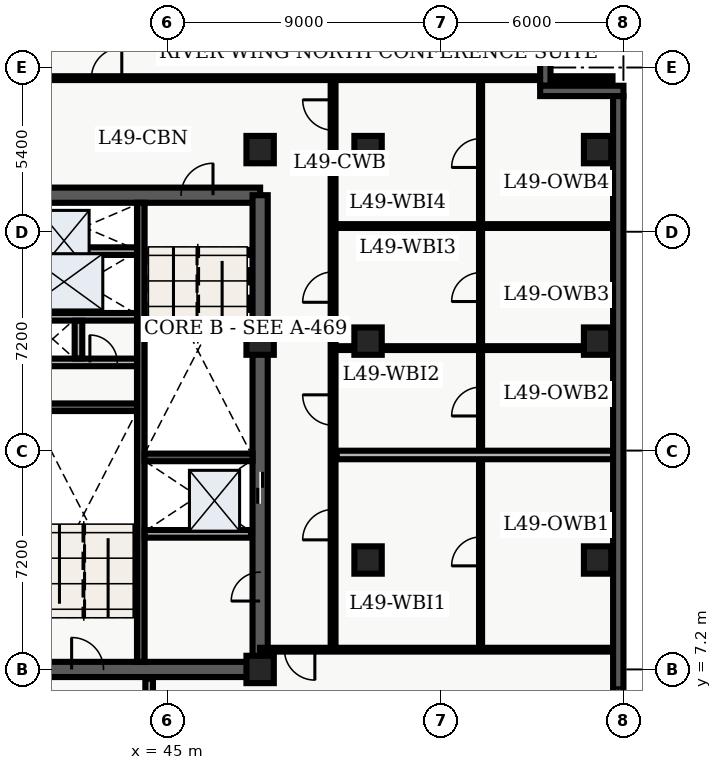
"""IFC4 building model, lengths in metres.
Left out: names, types, materials, properties, quantities, classifications, styles, units other than length and angle.
Written with IfcOpenShell. Run it as: python <this file> out.ifc"""

import sys

from ifc_helpers import new_model, entity, si_unit, converted_unit, direction, frame, origin_with_axes, origin_2d_with_axis, place, context, subcontext, project, spatial, polyline, rectangle, outline, extrude, element, fill, save


model = new_model("IFC4")
c1 = context("Model", 3, precision=1e-05, world=origin_with_axes(), true_north=direction((0.0, 1.0)))
c2 = subcontext(c1, "Body", "Model", "MODEL_VIEW")
j1 = project(units=[si_unit("LENGTHUNIT", "METRE"), converted_unit("PLANEANGLEUNIT", "DEGREE", entity("IfcPlaneAngleMeasure", 0.017), si_unit("PLANEANGLEUNIT", "RADIAN"), dimensions=[0, 0, 0, 0, 0, 0, 0])], contexts=[c1])
p1 = place(None, origin_with_axes())
s1 = spatial("IfcSite", under=j1, at=p1, CompositionType="ELEMENT")
p2 = place(p1, origin_with_axes())
s2 = spatial("IfcBuilding", under=s1, at=p2, CompositionType="ELEMENT")
p3 = place(p2, frame((0.0, 0.0, 200.4), z_axis=(0.0, 0.0, 1.0), x_axis=(1.0, 0.0, 0.0)))
s3 = spatial("IfcBuildingStorey", under=s2, at=p3, CompositionType="ELEMENT", Elevation=200.4)
p4 = place(p3, frame((40.2, 7.2, 0.0), z_axis=(0.0, 0.0, 1.0), x_axis=(1.0, 0.0, 0.0)))
e1 = element("IfcWall", 1, at=p4, inside=s3, PredefinedType="SHEAR", context=c2, shape_type="SweptSolid", body=[
    extrude(outline(polyline([(0.0, -0.25), (7.85, -0.25), (7.85, 0.25), (0.0, 0.25), (0.0, -0.25)])), origin_with_axes(), (0.0, 0.0, 1.0), 3.66),
])
p5 = place(p4, frame((2.175, 0.0, 0.0), z_axis=(0.0, 0.0, 1.0), x_axis=(1.0, 0.0, 0.0)))
e2 = element("IfcOpeningElement", 2, at=p5, cuts=e1, PredefinedType="OPENING", context=c2, shape_type="SweptSolid", body=[
    extrude(rectangle(XDim=1.05, YDim=0.52, at=origin_2d_with_axis()), origin_with_axes(), (0.0, 0.0, 1.0), 2.15),
])
p6 = place(p3, frame((40.2, 22.8, 0.0), z_axis=(0.0, 0.0, 1.0), x_axis=(1.0, 0.0, 0.0)))
e3 = element("IfcWall", 3, at=p6, inside=s3, PredefinedType="SHEAR", context=c2, shape_type="SweptSolid", body=[
    extrude(outline(polyline([(0.0, -0.25), (7.85, -0.25), (7.85, 0.25), (0.0, 0.25), (0.0, -0.25)])), origin_with_axes(), (0.0, 0.0, 1.0), 3.66),
])
p7 = place(p6, frame((5.775, 0.0, 0.0), z_axis=(0.0, 0.0, 1.0), x_axis=(1.0, 0.0, 0.0)))
e4 = element("IfcOpeningElement", 4, at=p7, cuts=e3, PredefinedType="OPENING", context=c2, shape_type="SweptSolid", body=[
    extrude(rectangle(XDim=1.05, YDim=0.52, at=origin_2d_with_axis()), origin_with_axes(), (0.0, 0.0, 1.0), 2.15),
])
p8 = place(p3, frame((48.05, 7.2, 0.0), z_axis=(0.0, 0.0, 1.0), x_axis=(0.0, 1.0, 0.0)))
e5 = element("IfcWall", 5, at=p8, inside=s3, PredefinedType="SHEAR", context=c2, shape_type="SweptSolid", body=[
    extrude(outline(polyline([(0.0, -0.25), (15.6, -0.25), (15.6, 0.25), (0.0, 0.25), (0.0, -0.25)])), origin_with_axes(), (0.0, 0.0, 1.0), 3.66),
])
p9 = place(p8, frame((5.975, 0.0, 0.0), z_axis=(0.0, 0.0, 1.0), x_axis=(1.0, 0.0, 0.0)))
e6 = element("IfcOpeningElement", 6, at=p9, cuts=e5, PredefinedType="OPENING", context=c2, shape_type="SweptSolid", body=[
    extrude(rectangle(XDim=1.05, YDim=0.52, at=origin_2d_with_axis()), origin_with_axes(), (0.0, 0.0, 1.0), 2.15),
])
p10 = place(p8, frame((2.725, 0.0, 0.0), z_axis=(0.0, 0.0, 1.0), x_axis=(1.0, 0.0, 0.0)))
e7 = element("IfcOpeningElement", 7, at=p10, cuts=e5, PredefinedType="OPENING", context=c2, shape_type="SweptSolid", body=[
    extrude(rectangle(XDim=0.95, YDim=0.52, at=origin_2d_with_axis()), origin_with_axes(), (0.0, 0.0, 1.0), 2.15),
])
p11 = place(p3, frame((44.125, 7.45, 0.0), z_axis=(0.0, 0.0, 1.0), x_axis=(0.0, 1.0, 0.0)))
e8 = element("IfcWall", 8, at=p11, inside=s3, PredefinedType="SHEAR", context=c2, shape_type="SweptSolid", body=[
    extrude(outline(polyline([(0.0, -0.125), (15.1, -0.125), (15.1, 0.125), (0.0, 0.125), (0.0, -0.125)])), origin_with_axes(), (0.0, 0.0, 1.0), 3.66),
])
for number, where, z_axis, x_axis in (
    (9, (40.45, 15.825, 0.0), (0.0, 0.0, 1.0), (1.0, 0.0, 0.0)),
    (10, (44.25, 14.175, 0.0), (0.0, 0.0, 1.0), (1.0, 0.0, 0.0)),
):
    element("IfcWall", number, at=place(p3, frame(where, z_axis=z_axis, x_axis=x_axis)), inside=s3, PredefinedType="SHEAR", context=c2, shape_type="SweptSolid", body=[
        extrude(outline(polyline([(0.0, -0.125), (3.55, -0.125), (3.55, 0.125), (0.0, 0.125), (0.0, -0.125)])), origin_with_axes(), (0.0, 0.0, 1.0), 3.66),
    ])
p12 = place(p3, frame((40.5, 17.3, 0.0), z_axis=(0.0, 0.0, 1.0), x_axis=(1.0, 0.0, 0.0)))
e11 = element("IfcWall", 11, at=p12, inside=s3, PredefinedType="SOLIDWALL", context=c2, shape_type="SweptSolid", body=[
    extrude(outline(polyline([(0.0, -0.125), (3.5, -0.125), (3.5, 0.125), (0.0, 0.125), (0.0, -0.125)])), origin_with_axes(), (0.0, 0.0, 1.0), 2.7),
])
p13 = place(p12, frame((2.4, 0.0, 0.0), z_axis=(0.0, 0.0, 1.0), x_axis=(1.0, 0.0, 0.0)))
e12 = element("IfcOpeningElement", 12, at=p13, cuts=e11, PredefinedType="OPENING", context=c2, shape_type="SweptSolid", body=[
    extrude(rectangle(XDim=0.9, YDim=0.27, at=origin_2d_with_axis()), origin_with_axes(), (0.0, 0.0, 1.0), 2.15),
])
p14 = place(p3, frame((40.5, 18.8, 0.0), z_axis=(0.0, 0.0, 1.0), x_axis=(1.0, 0.0, 0.0)))
e13 = element("IfcWall", 13, at=p14, inside=s3, PredefinedType="SOLIDWALL", context=c2, shape_type="SweptSolid", body=[
    extrude(outline(polyline([(0.0, -0.125), (3.5, -0.125), (3.5, 0.125), (0.0, 0.125), (0.0, -0.125)])), origin_with_axes(), (0.0, 0.0, 1.0), 2.7),
])
p15 = place(p3, frame((42.075, 17.43, 0.0), z_axis=(0.0, 0.0, 1.0), x_axis=(0.0, 1.0, 0.0)))
e14 = element("IfcWall", 14, at=p15, inside=s3, PredefinedType="SOLIDWALL", context=c2, shape_type="SweptSolid", body=[
    extrude(outline(polyline([(0.0, -0.125), (1.24, -0.125), (1.24, 0.125), (0.0, 0.125), (0.0, -0.125)])), origin_with_axes(), (0.0, 0.0, 1.0), 2.7),
])
p16 = place(p3, frame((44.4, 3.1, 0.0), z_axis=(0.0, 0.0, 1.0), x_axis=(0.0, 1.0, 0.0)))
e15 = element("IfcWall", 15, at=p16, inside=s3, PredefinedType="SOLIDWALL", context=c2, shape_type="SweptSolid", body=[
    extrude(outline(polyline([(0.0, -0.125), (3.8, -0.125), (3.8, 0.125), (0.0, 0.125), (0.0, -0.125)])), origin_with_axes(), (0.0, 0.0, 1.0), 2.7),
])
for number, where, z_axis, x_axis in (
    (16, (48.05, 7.2, 0.0), (0.0, 0.0, 1.0), (1.0, 0.0, 0.0)),
    (17, (48.05, 18.0, 0.0), (0.0, 0.0, 1.0), (1.0, 0.0, 0.0)),
    (18, (48.05, 24.3, 0.0), (0.0, 0.0, 1.0), (1.0, 0.0, 0.0)),
    (19, (51.6, 10.8, 0.0), (0.0, 0.0, 1.0), (1.0, 0.0, 0.0)),
    (20, (51.6, 18.0, 0.0), (0.0, 0.0, 1.0), (1.0, 0.0, 0.0)),
    (21, (51.6, 24.3, 0.0), (0.0, 0.0, 1.0), (1.0, 0.0, 0.0)),
    (22, (59.15, 10.8, 0.0), (0.0, 0.0, 1.0), (1.0, 0.0, 0.0)),
    (23, (59.15, 18.0, 0.0), (0.0, 0.0, 1.0), (1.0, 0.0, 0.0)),
    (24, (59.15, 24.3, 0.0), (0.0, 0.0, 1.0), (1.0, 0.0, 0.0)),
):
    element("IfcColumn", number, at=place(p3, frame(where, z_axis=z_axis, x_axis=x_axis)), inside=s3, PredefinedType="COLUMN", context=c2, shape_type="SweptSolid", body=[
        extrude(rectangle(XDim=0.9, YDim=0.9, at=origin_2d_with_axis()), origin_with_axes(), (0.0, 0.0, 1.0), 3.9),
    ])
for number, where, z_axis, x_axis in (
    (25, (40.5, 20.96, 0.0), (0.0, 0.0, 1.0), (1.0, 0.0, 0.0)),
    (26, (44.25, 11.66, 0.0), (0.0, 0.0, 1.0), (1.0, 0.0, 0.0)),
):
    element("IfcWall", number, at=place(p3, frame(where, z_axis=z_axis, x_axis=x_axis)), inside=s3, PredefinedType="SOLIDWALL", context=c2, shape_type="SweptSolid", body=[
        extrude(outline(polyline([(0.0, -0.125), (3.5, -0.125), (3.5, 0.125), (0.0, 0.125), (0.0, -0.125)])), origin_with_axes(), (0.0, 0.0, 1.0), 2.7),
    ])
p17 = place(p3, frame((50.45, 7.85, 0.0), z_axis=(0.0, 0.0, 1.0), x_axis=(0.0, 1.0, 0.0)))
e27 = element("IfcWall", 27, at=p17, inside=s3, PredefinedType="PARTITIONING", context=c2, shape_type="SweptSolid", body=[
    extrude(outline(polyline([(0.0, -0.08), (18.8, -0.08), (18.8, 0.08), (0.0, 0.08), (0.0, -0.08)])), origin_with_axes(), (0.0, 0.0, 1.0), 2.7),
])
p18 = place(p17, frame((4.113, 0.0, 0.0), z_axis=(0.0, 0.0, 1.0), x_axis=(1.0, 0.0, 0.0)))
e28 = element("IfcOpeningElement", 28, at=p18, cuts=e27, PredefinedType="OPENING", context=c2, shape_type="SweptSolid", body=[
    extrude(rectangle(XDim=1.0, YDim=0.18, at=origin_2d_with_axis()), origin_with_axes(), (0.0, 0.0, 1.0), 2.15),
])
p19 = place(p17, frame((7.883, 0.0, 0.0), z_axis=(0.0, 0.0, 1.0), x_axis=(1.0, 0.0, 0.0)))
e29 = element("IfcOpeningElement", 29, at=p19, cuts=e27, PredefinedType="OPENING", context=c2, shape_type="SweptSolid", body=[
    extrude(rectangle(XDim=1.0, YDim=0.18, at=origin_2d_with_axis()), origin_with_axes(), (0.0, 0.0, 1.0), 2.15),
])
p20 = place(p17, frame((11.928, 0.0, 0.0), z_axis=(0.0, 0.0, 1.0), x_axis=(1.0, 0.0, 0.0)))
e30 = element("IfcOpeningElement", 30, at=p20, cuts=e27, PredefinedType="OPENING", context=c2, shape_type="SweptSolid", body=[
    extrude(rectangle(XDim=1.0, YDim=0.18, at=origin_2d_with_axis()), origin_with_axes(), (0.0, 0.0, 1.0), 2.15),
])
p21 = place(p17, frame((17.587, 0.0, 0.0), z_axis=(0.0, 0.0, 1.0), x_axis=(1.0, 0.0, 0.0)))
e31 = element("IfcOpeningElement", 31, at=p21, cuts=e27, PredefinedType="OPENING", context=c2, shape_type="SweptSolid", body=[
    extrude(rectangle(XDim=1.0, YDim=0.18, at=origin_2d_with_axis()), origin_with_axes(), (0.0, 0.0, 1.0), 2.15),
])
p22 = place(p3, frame((59.665, 7.85, 0.0), z_axis=(0.0, 0.0, 1.0), x_axis=(-1.0, 0.0, 0.0)))
e32 = element("IfcWall", 32, at=p22, inside=s3, PredefinedType="PARTITIONING", context=c2, shape_type="SweptSolid", body=[
    extrude(outline(polyline([(0.0, -0.062), (11.615, -0.062), (11.615, 0.062), (0.0, 0.062), (0.0, -0.062)])), origin_with_axes(), (0.0, 0.0, 1.0), 2.7),
])
p23 = place(p22, frame((10.315, 0.0, 0.0), z_axis=(0.0, 0.0, 1.0), x_axis=(1.0, 0.0, 0.0)))
e33 = element("IfcOpeningElement", 33, at=p23, cuts=e32, PredefinedType="OPENING", context=c2, shape_type="SweptSolid", body=[
    extrude(rectangle(XDim=1.0, YDim=0.145, at=origin_2d_with_axis()), origin_with_axes(), (0.0, 0.0, 1.0), 2.15),
])
p24 = place(p3, frame((38.735, 26.65, 0.0), z_axis=(0.0, 0.0, 1.0), x_axis=(1.0, 0.0, 0.0)))
e34 = element("IfcWall", 34, at=p24, inside=s3, PredefinedType="PARTITIONING", context=c2, shape_type="SweptSolid", body=[
    extrude(outline(polyline([(0.0, -0.062), (20.905, -0.062), (20.905, 0.062), (0.0, 0.062), (0.0, -0.062)])), origin_with_axes(), (0.0, 0.0, 1.0), 2.7),
])
p25 = place(p24, frame((4.265, 0.0, 0.0), z_axis=(0.0, 0.0, 1.0), x_axis=(1.0, 0.0, 0.0)))
e35 = element("IfcOpeningElement", 35, at=p25, cuts=e34, PredefinedType="OPENING", context=c2, shape_type="SweptSolid", body=[
    extrude(rectangle(XDim=1.0, YDim=0.145, at=origin_2d_with_axis()), origin_with_axes(), (0.0, 0.0, 1.0), 2.15),
])
p26 = place(p3, frame((55.3, 7.98, 0.0), z_axis=(0.0, 0.0, 1.0), x_axis=(0.0, 1.0, 0.0)))
e36 = element("IfcWall", 36, at=p26, inside=s3, PredefinedType="PARTITIONING", context=c2, shape_type="SweptSolid", body=[
    extrude(outline(polyline([(0.0, -0.05), (18.54, -0.05), (18.54, 0.05), (0.0, 0.05), (0.0, -0.05)])), origin_with_axes(), (0.0, 0.0, 1.0), 2.7),
])
p27 = place(p26, frame((3.103, 0.0, 0.0), z_axis=(0.0, 0.0, 1.0), x_axis=(1.0, 0.0, 0.0)))
e37 = element("IfcOpeningElement", 37, at=p27, cuts=e36, PredefinedType="OPENING", context=c2, shape_type="SweptSolid", body=[
    extrude(rectangle(XDim=0.95, YDim=0.12, at=origin_2d_with_axis()), origin_with_axes(), (0.0, 0.0, 1.0), 2.15),
])
p28 = place(p26, frame((8.033, 0.0, 0.0), z_axis=(0.0, 0.0, 1.0), x_axis=(1.0, 0.0, 0.0)))
e38 = element("IfcOpeningElement", 38, at=p28, cuts=e36, PredefinedType="OPENING", context=c2, shape_type="SweptSolid", body=[
    extrude(rectangle(XDim=0.95, YDim=0.12, at=origin_2d_with_axis()), origin_with_axes(), (0.0, 0.0, 1.0), 2.15),
])
p29 = place(p26, frame((11.797, 0.0, 0.0), z_axis=(0.0, 0.0, 1.0), x_axis=(1.0, 0.0, 0.0)))
e39 = element("IfcOpeningElement", 39, at=p29, cuts=e36, PredefinedType="OPENING", context=c2, shape_type="SweptSolid", body=[
    extrude(rectangle(XDim=0.95, YDim=0.12, at=origin_2d_with_axis()), origin_with_axes(), (0.0, 0.0, 1.0), 2.15),
])
p30 = place(p26, frame((16.207, 0.0, 0.0), z_axis=(0.0, 0.0, 1.0), x_axis=(1.0, 0.0, 0.0)))
e40 = element("IfcOpeningElement", 40, at=p30, cuts=e36, PredefinedType="OPENING", context=c2, shape_type="SweptSolid", body=[
    extrude(rectangle(XDim=0.95, YDim=0.12, at=origin_2d_with_axis()), origin_with_axes(), (0.0, 0.0, 1.0), 2.15),
])
p31 = place(p3, frame((50.57, 14.255, 0.0), z_axis=(0.0, 0.0, 1.0), x_axis=(1.0, 0.0, 0.0)))
e41 = element("IfcWall", 41, at=p31, inside=s3, PredefinedType="PARTITIONING", context=c2, shape_type="SweptSolid", body=[
    extrude(outline(polyline([(0.0, -0.14), (9.095, -0.14), (9.095, 0.14), (0.0, 0.14), (0.0, -0.14)])), origin_with_axes(), (0.0, 0.0, 1.0), 2.7),
])
for number, where, z_axis, x_axis in (
    (42, (50.57, 17.77, 0.0), (0.0, 0.0, 1.0), (1.0, 0.0, 0.0)),
    (43, (50.57, 21.785, 0.0), (0.0, 0.0, 1.0), (1.0, 0.0, 0.0)),
):
    element("IfcWall", number, at=place(p3, frame(where, z_axis=z_axis, x_axis=x_axis)), inside=s3, PredefinedType="PARTITIONING", context=c2, shape_type="SweptSolid", body=[
        extrude(outline(polyline([(0.0, -0.062), (9.095, -0.062), (9.095, 0.062), (0.0, 0.062), (0.0, -0.062)])), origin_with_axes(), (0.0, 0.0, 1.0), 2.7),
    ])
p32 = place(p3, frame((57.43, 28.46, 0.0), z_axis=(0.0, 0.0, 1.0), x_axis=(0.0, -1.0, 0.0)))
e44 = element("IfcWall", 44, at=p32, inside=s3, PredefinedType="SOLIDWALL", context=c2, shape_type="SweptSolid", body=[
    extrude(outline(polyline([(0.0, -0.17), (2.06, -0.17), (2.06, 0.17), (0.0, 0.17), (0.0, -0.17)])), origin_with_axes(), (0.0, 0.0, 1.0), 3.66),
])
p33 = place(p3, frame((57.26, 26.23, 0.0), z_axis=(0.0, 0.0, 1.0), x_axis=(1.0, 0.0, 0.0)))
e45 = element("IfcWall", 45, at=p33, inside=s3, PredefinedType="SOLIDWALL", context=c2, shape_type="SweptSolid", body=[
    extrude(outline(polyline([(0.0, -0.17), (2.74, -0.17), (2.74, 0.17), (0.0, 0.17), (0.0, -0.17)])), origin_with_axes(), (0.0, 0.0, 1.0), 3.66),
])
p34 = place(p3, frame((59.83, 26.06, 0.0), z_axis=(0.0, 0.0, 1.0), x_axis=(0.0, -1.0, 0.0)))
e46 = element("IfcWall", 46, at=p34, inside=s3, PredefinedType="SOLIDWALL", context=c2, shape_type="SweptSolid", body=[
    extrude(outline(polyline([(0.0, -0.17), (23.66, -0.17), (23.66, 0.17), (0.0, 0.17), (0.0, -0.17)])), origin_with_axes(), (0.0, 0.0, 1.0), 3.66),
])
p35 = place(p34, frame((20.364, 0.0, 0.45), z_axis=(0.0, 0.0, 1.0), x_axis=(1.0, 0.0, 0.0)))
e47 = element("IfcOpeningElement", 47, at=p35, cuts=e46, PredefinedType="OPENING", context=c2, shape_type="SweptSolid", body=[
    extrude(rectangle(XDim=1.8, YDim=0.36, at=origin_2d_with_axis()), origin_with_axes(), (0.0, 0.0, 1.0), 2.1),
])
p36 = place(p8, frame((5.975, 0.0, 0.0), z_axis=(0.0, 0.0, 1.0), x_axis=(1.0, 0.0, 0.0)))
e48 = element("IfcDoor", 48, at=p36, inside=s3, OperationType="SLIDING_TO_LEFT", PredefinedType="DOOR", context=c2, shape_type="SweptSolid", body=[
    extrude(rectangle(XDim=1.05, YDim=0.09, at=origin_2d_with_axis()), origin_with_axes(), (0.0, 0.0, 1.0), 2.15),
])
fill(e6, e48)
p37 = place(p12, frame((2.4, 0.0, 0.0), z_axis=(0.0, 0.0, 1.0), x_axis=(1.0, 0.0, 0.0)))
e49 = element("IfcDoor", 49, at=p37, inside=s3, OperationType="SINGLE_SWING_LEFT", PredefinedType="DOOR", context=c2, shape_type="SweptSolid", body=[
    extrude(rectangle(XDim=0.9, YDim=0.09, at=origin_2d_with_axis()), origin_with_axes(), (0.0, 0.0, 1.0), 2.15),
])
fill(e12, e49)
p38 = place(p4, frame((2.175, 0.0, 0.0), z_axis=(0.0, 0.0, 1.0), x_axis=(1.0, 0.0, 0.0)))
e50 = element("IfcDoor", 50, at=p38, inside=s3, OperationType="SINGLE_SWING_LEFT", PredefinedType="DOOR", context=c2, shape_type="SweptSolid", body=[
    extrude(rectangle(XDim=1.05, YDim=0.09, at=origin_2d_with_axis()), origin_with_axes(), (0.0, 0.0, 1.0), 2.15),
])
fill(e2, e50)
p39 = place(p6, frame((5.775, 0.0, 0.0), z_axis=(0.0, 0.0, 1.0), x_axis=(1.0, 0.0, 0.0)))
e51 = element("IfcDoor", 51, at=p39, inside=s3, OperationType="SINGLE_SWING_RIGHT", PredefinedType="DOOR", context=c2, shape_type="SweptSolid", body=[
    extrude(rectangle(XDim=1.05, YDim=0.09, at=origin_2d_with_axis()), origin_with_axes(), (0.0, 0.0, 1.0), 2.15),
])
fill(e4, e51)
p40 = place(p8, frame((2.725, 0.0, 0.0), z_axis=(0.0, 0.0, 1.0), x_axis=(1.0, 0.0, 0.0)))
e52 = element("IfcDoor", 52, at=p40, inside=s3, OperationType="SINGLE_SWING_LEFT", PredefinedType="DOOR", context=c2, shape_type="SweptSolid", body=[
    extrude(rectangle(XDim=0.95, YDim=0.09, at=origin_2d_with_axis()), origin_with_axes(), (0.0, 0.0, 1.0), 2.15),
])
fill(e7, e52)
p41 = place(p22, frame((10.315, 0.0, 0.0), z_axis=(0.0, 0.0, 1.0), x_axis=(1.0, 0.0, 0.0)))
e53 = element("IfcDoor", 53, at=p41, inside=s3, OperationType="SINGLE_SWING_LEFT", PredefinedType="DOOR", context=c2, shape_type="SweptSolid", body=[
    extrude(rectangle(XDim=1.0, YDim=0.075, at=origin_2d_with_axis()), origin_with_axes(), (0.0, 0.0, 1.0), 2.15),
])
fill(e33, e53)
p42 = place(p24, frame((4.265, 0.0, 0.0), z_axis=(0.0, 0.0, 1.0), x_axis=(1.0, 0.0, 0.0)))
e54 = element("IfcDoor", 54, at=p42, inside=s3, OperationType="SINGLE_SWING_RIGHT", PredefinedType="DOOR", context=c2, shape_type="SweptSolid", body=[
    extrude(rectangle(XDim=1.0, YDim=0.075, at=origin_2d_with_axis()), origin_with_axes(), (0.0, 0.0, 1.0), 2.15),
])
fill(e35, e54)
p43 = place(p26, frame((3.103, 0.0, 0.0), z_axis=(0.0, 0.0, 1.0), x_axis=(1.0, 0.0, 0.0)))
e55 = element("IfcDoor", 55, at=p43, inside=s3, OperationType="SINGLE_SWING_LEFT", PredefinedType="DOOR", context=c2, shape_type="SweptSolid", body=[
    extrude(rectangle(XDim=0.95, YDim=0.06, at=origin_2d_with_axis()), origin_with_axes(), (0.0, 0.0, 1.0), 2.15),
])
fill(e37, e55)
p44 = place(p17, frame((4.113, 0.0, 0.0), z_axis=(0.0, 0.0, 1.0), x_axis=(1.0, 0.0, 0.0)))
e56 = element("IfcDoor", 56, at=p44, inside=s3, OperationType="SINGLE_SWING_LEFT", PredefinedType="DOOR", context=c2, shape_type="SweptSolid", body=[
    extrude(rectangle(XDim=1.0, YDim=0.09, at=origin_2d_with_axis()), origin_with_axes(), (0.0, 0.0, 1.0), 2.15),
])
fill(e28, e56)
p45 = place(p26, frame((8.033, 0.0, 0.0), z_axis=(0.0, 0.0, 1.0), x_axis=(1.0, 0.0, 0.0)))
e57 = element("IfcDoor", 57, at=p45, inside=s3, OperationType="SINGLE_SWING_LEFT", PredefinedType="DOOR", context=c2, shape_type="SweptSolid", body=[
    extrude(rectangle(XDim=0.95, YDim=0.06, at=origin_2d_with_axis()), origin_with_axes(), (0.0, 0.0, 1.0), 2.15),
])
fill(e38, e57)
p46 = place(p17, frame((7.883, 0.0, 0.0), z_axis=(0.0, 0.0, 1.0), x_axis=(1.0, 0.0, 0.0)))
e58 = element("IfcDoor", 58, at=p46, inside=s3, OperationType="SINGLE_SWING_RIGHT", PredefinedType="DOOR", context=c2, shape_type="SweptSolid", body=[
    extrude(rectangle(XDim=1.0, YDim=0.09, at=origin_2d_with_axis()), origin_with_axes(), (0.0, 0.0, 1.0), 2.15),
])
fill(e29, e58)
p47 = place(p26, frame((11.797, 0.0, 0.0), z_axis=(0.0, 0.0, 1.0), x_axis=(1.0, 0.0, 0.0)))
e59 = element("IfcDoor", 59, at=p47, inside=s3, OperationType="SINGLE_SWING_LEFT", PredefinedType="DOOR", context=c2, shape_type="SweptSolid", body=[
    extrude(rectangle(XDim=0.95, YDim=0.06, at=origin_2d_with_axis()), origin_with_axes(), (0.0, 0.0, 1.0), 2.15),
])
fill(e39, e59)
p48 = place(p17, frame((11.928, 0.0, 0.0), z_axis=(0.0, 0.0, 1.0), x_axis=(1.0, 0.0, 0.0)))
e60 = element("IfcDoor", 60, at=p48, inside=s3, OperationType="SINGLE_SWING_LEFT", PredefinedType="DOOR", context=c2, shape_type="SweptSolid", body=[
    extrude(rectangle(XDim=1.0, YDim=0.09, at=origin_2d_with_axis()), origin_with_axes(), (0.0, 0.0, 1.0), 2.15),
])
fill(e30, e60)
p49 = place(p26, frame((16.207, 0.0, 0.0), z_axis=(0.0, 0.0, 1.0), x_axis=(1.0, 0.0, 0.0)))
e61 = element("IfcDoor", 61, at=p49, inside=s3, OperationType="SINGLE_SWING_LEFT", PredefinedType="DOOR", context=c2, shape_type="SweptSolid", body=[
    extrude(rectangle(XDim=0.95, YDim=0.06, at=origin_2d_with_axis()), origin_with_axes(), (0.0, 0.0, 1.0), 2.15),
])
fill(e40, e61)
p50 = place(p17, frame((17.587, 0.0, 0.0), z_axis=(0.0, 0.0, 1.0), x_axis=(1.0, 0.0, 0.0)))
e62 = element("IfcDoor", 62, at=p50, inside=s3, OperationType="SINGLE_SWING_RIGHT", PredefinedType="DOOR", context=c2, shape_type="SweptSolid", body=[
    extrude(rectangle(XDim=1.0, YDim=0.09, at=origin_2d_with_axis()), origin_with_axes(), (0.0, 0.0, 1.0), 2.15),
])
fill(e31, e62)
p51 = place(p34, frame((20.364, 0.0, 0.45), z_axis=(0.0, 0.0, 1.0), x_axis=(1.0, 0.0, 0.0)))
e63 = element("IfcWindow", 63, at=p51, inside=s3, PredefinedType="WINDOW", context=c2, shape_type="SweptSolid", body=[
    extrude(rectangle(XDim=1.8, YDim=0.09, at=origin_2d_with_axis()), origin_with_axes(), (0.0, 0.0, 1.0), 2.1),
])
fill(e47, e63)
save(model, sys.argv[1])
